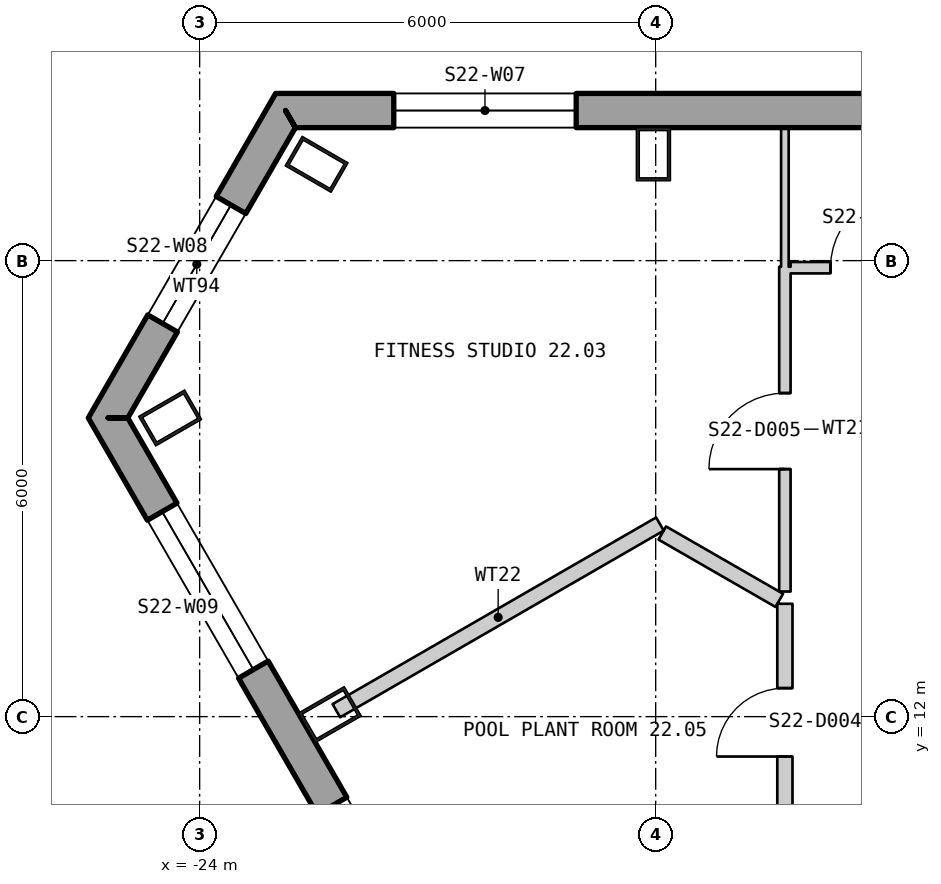
"""IFC4 building model, lengths in metres.
Left out: names, types, materials, properties, quantities, classifications, styles, units other than length and angle.
Written with IfcOpenShell. Run it as: python <this file> out.ifc"""

import sys

from ifc_helpers import new_model, si_unit, direction, frame, frame_2d, origin, origin_2d, place, context, subcontext, project, spatial, polyline, rectangle, hollow_rectangle, outline, extrude, element, fill, save


model = new_model("IFC4")
c1 = context("Model", 3, precision=1e-05, world=origin(), true_north=direction((0.0, 1.0)))
c2 = subcontext(c1, "Body", "Model", "MODEL_VIEW")
j1 = project(units=[si_unit("LENGTHUNIT", "METRE"), si_unit("PLANEANGLEUNIT", "RADIAN")], contexts=[c1])
p1 = place(None, origin())
s1 = spatial("IfcSite", under=j1, at=p1, CompositionType="ELEMENT")
p2 = place(p1, origin())
s2 = spatial("IfcBuilding", under=s1, at=p2, CompositionType="ELEMENT")
p3 = place(p2, frame((0.0, 0.0, 298.2)))
s3 = spatial("IfcBuildingStorey", under=s2, at=p3, CompositionType="ELEMENT", Elevation=298.2)
for number, where, z_axis, x_axis in (
    (1, (-18.03, 19.4, 0.0), (0.0, 0.0, 1.0), (-1.0, 0.0, 0.0)),
    (2, (-22.461, 19.267, 0.0), (0.0, 0.0, 1.0), (-0.5, -0.866, 0.0)),
    (3, (-24.388, 15.93, 0.0), (0.0, 0.0, 1.0), (0.5, -0.866, 0.0)),
    (4, (-22.287, 12.027, 0.0), (0.0, 0.0, 1.0), (0.5, -0.866, 0.0)),
):
    element("IfcColumn", number, at=place(p3, frame(where, z_axis=z_axis, x_axis=x_axis)), inside=s3, PredefinedType="COLUMN", context=c2, shape_type="SweptSolid", body=[
        extrude(hollow_rectangle(XDim=0.45, YDim=0.7, WallThickness=0.04, at=origin_2d()), origin(), (0.0, 0.0, 1.0), 6.0),
    ])
p4 = place(p3, frame((22.87, 19.975, -0.4), z_axis=(0.0, 0.0, 1.0), x_axis=(-1.0, 0.0, 0.0)))
e5 = element("IfcWall", 5, at=p4, inside=s3, PredefinedType="SOLIDWALL", context=c2, shape_type="SweptSolid", body=[
    extrude(outline(polyline([(-0.13, -0.225), (45.87, -0.225), (45.61, 0.225), (0.13, 0.225), (-0.13, -0.225)])), origin(), (0.0, 0.0, 1.0), 6.0),
])
p5 = place(p4, frame((1.424, 0.0, 1.3)))
e6 = element("IfcOpeningElement", 6, at=p5, cuts=e5, PredefinedType="OPENING", context=c2, shape_type="SweptSolid", body=[
    extrude(rectangle(XDim=2.4, YDim=4.1, at=frame_2d((1.2, 2.05))), frame((0.0, 0.235, 0.0), z_axis=(0.0, -1.0, 0.0), x_axis=(1.0, 0.0, 0.0)), (0.0, 0.0, 1.0), 0.47),
])
p6 = place(p4, frame((14.909, 0.0, 1.3)))
e7 = element("IfcOpeningElement", 7, at=p6, cuts=e5, PredefinedType="OPENING", context=c2, shape_type="SweptSolid", body=[
    extrude(rectangle(XDim=2.4, YDim=4.1, at=frame_2d((1.2, 2.05))), frame((0.0, 0.235, 0.0), z_axis=(0.0, -1.0, 0.0), x_axis=(1.0, 0.0, 0.0)), (0.0, 0.0, 1.0), 0.47),
])
p7 = place(p4, frame((19.416, 0.0, 1.3)))
e8 = element("IfcOpeningElement", 8, at=p7, cuts=e5, PredefinedType="OPENING", context=c2, shape_type="SweptSolid", body=[
    extrude(rectangle(XDim=2.4, YDim=4.1, at=frame_2d((1.2, 2.05))), frame((0.0, 0.235, 0.0), z_axis=(0.0, -1.0, 0.0), x_axis=(1.0, 0.0, 0.0)), (0.0, 0.0, 1.0), 0.47),
])
p8 = place(p4, frame((23.924, 0.0, 1.3)))
e9 = element("IfcOpeningElement", 9, at=p8, cuts=e5, PredefinedType="OPENING", context=c2, shape_type="SweptSolid", body=[
    extrude(rectangle(XDim=2.4, YDim=4.1, at=frame_2d((1.2, 2.05))), frame((0.0, 0.235, 0.0), z_axis=(0.0, -1.0, 0.0), x_axis=(1.0, 0.0, 0.0)), (0.0, 0.0, 1.0), 0.47),
])
p9 = place(p4, frame((28.431, 0.0, 1.3)))
e10 = element("IfcOpeningElement", 10, at=p9, cuts=e5, PredefinedType="OPENING", context=c2, shape_type="SweptSolid", body=[
    extrude(rectangle(XDim=2.4, YDim=4.1, at=frame_2d((1.2, 2.05))), frame((0.0, 0.235, 0.0), z_axis=(0.0, -1.0, 0.0), x_axis=(1.0, 0.0, 0.0)), (0.0, 0.0, 1.0), 0.47),
])
p10 = place(p4, frame((32.939, 0.0, 1.3)))
e11 = element("IfcOpeningElement", 11, at=p10, cuts=e5, PredefinedType="OPENING", context=c2, shape_type="SweptSolid", body=[
    extrude(rectangle(XDim=2.4, YDim=4.1, at=frame_2d((1.2, 2.05))), frame((0.0, 0.235, 0.0), z_axis=(0.0, -1.0, 0.0), x_axis=(1.0, 0.0, 0.0)), (0.0, 0.0, 1.0), 0.47),
])
p11 = place(p4, frame((41.916, 0.0, 1.3)))
e12 = element("IfcOpeningElement", 12, at=p11, cuts=e5, PredefinedType="OPENING", context=c2, shape_type="SweptSolid", body=[
    extrude(rectangle(XDim=2.4, YDim=4.1, at=frame_2d((1.2, 2.05))), frame((0.0, 0.235, 0.0), z_axis=(0.0, -1.0, 0.0), x_axis=(1.0, 0.0, 0.0)), (0.0, 0.0, 1.0), 0.47),
])
p12 = place(p3, frame((-22.87, 19.975, -0.4), z_axis=(0.0, 0.0, 1.0), x_axis=(-0.500001097856, -0.866024769936, 0.0)))
e13 = element("IfcWall", 13, at=p12, inside=s3, PredefinedType="SOLIDWALL", context=c2, shape_type="SweptSolid", body=[
    extrude(outline(polyline([(-0.13, -0.225), (4.8, -0.225), (4.54, 0.225), (0.13, 0.225), (-0.13, -0.225)])), origin(), (0.0, 0.0, 1.0), 6.0),
])
p13 = place(p12, frame((1.435, 0.0, 1.3)))
e14 = element("IfcOpeningElement", 14, at=p13, cuts=e13, PredefinedType="OPENING", context=c2, shape_type="SweptSolid", body=[
    extrude(rectangle(XDim=1.8, YDim=4.1, at=frame_2d((0.9, 2.05))), frame((0.0, 0.235, 0.0), z_axis=(0.0, -1.0, 0.0), x_axis=(1.0, 0.0, 0.0)), (0.0, 0.0, 1.0), 0.47),
])
p14 = place(p3, frame((-25.205, 15.931, -0.28), z_axis=(0.0, 0.0, 1.0), x_axis=(0.499999764979, -0.866025539474, 0.0)))
e15 = element("IfcWall", 15, at=p14, inside=s3, PredefinedType="SOLIDWALL", context=c2, shape_type="SweptSolid", body=[
    extrude(outline(polyline([(-0.13, -0.225), (45.87, -0.225), (45.61, 0.225), (0.13, 0.225), (-0.13, -0.225)])), origin(), (0.0, 0.0, 1.0), 6.1),
])
p15 = place(p14, frame((1.424, 0.0, 1.18)))
e16 = element("IfcOpeningElement", 16, at=p15, cuts=e15, PredefinedType="OPENING", context=c2, shape_type="SweptSolid", body=[
    extrude(rectangle(XDim=2.4, YDim=4.1, at=frame_2d((1.2, 2.05))), frame((0.0, 0.235, 0.0), z_axis=(0.0, -1.0, 0.0), x_axis=(1.0, 0.0, 0.0)), (0.0, 0.0, 1.0), 0.47),
])
p16 = place(p14, frame((5.893, 0.0, 1.18)))
e17 = element("IfcOpeningElement", 17, at=p16, cuts=e15, PredefinedType="OPENING", context=c2, shape_type="SweptSolid", body=[
    extrude(rectangle(XDim=2.4, YDim=4.1, at=frame_2d((1.2, 2.05))), frame((0.0, 0.235, 0.0), z_axis=(0.0, -1.0, 0.0), x_axis=(1.0, 0.0, 0.0)), (0.0, 0.0, 1.0), 0.47),
])
p17 = place(p14, frame((10.401, 0.0, 1.18)))
e18 = element("IfcOpeningElement", 18, at=p17, cuts=e15, PredefinedType="OPENING", context=c2, shape_type="SweptSolid", body=[
    extrude(rectangle(XDim=2.4, YDim=4.1, at=frame_2d((1.2, 2.05))), frame((0.0, 0.235, 0.0), z_axis=(0.0, -1.0, 0.0), x_axis=(1.0, 0.0, 0.0)), (0.0, 0.0, 1.0), 0.47),
])
p18 = place(p14, frame((14.909, 0.0, 1.18)))
e19 = element("IfcOpeningElement", 19, at=p18, cuts=e15, PredefinedType="OPENING", context=c2, shape_type="SweptSolid", body=[
    extrude(rectangle(XDim=2.4, YDim=4.1, at=frame_2d((1.2, 2.05))), frame((0.0, 0.235, 0.0), z_axis=(0.0, -1.0, 0.0), x_axis=(1.0, 0.0, 0.0)), (0.0, 0.0, 1.0), 0.47),
])
p19 = place(p14, frame((19.416, 0.0, 1.18)))
e20 = element("IfcOpeningElement", 20, at=p19, cuts=e15, PredefinedType="OPENING", context=c2, shape_type="SweptSolid", body=[
    extrude(rectangle(XDim=2.4, YDim=4.1, at=frame_2d((1.2, 2.05))), frame((0.0, 0.235, 0.0), z_axis=(0.0, -1.0, 0.0), x_axis=(1.0, 0.0, 0.0)), (0.0, 0.0, 1.0), 0.47),
])
p20 = place(p14, frame((23.924, 0.0, 1.18)))
e21 = element("IfcOpeningElement", 21, at=p20, cuts=e15, PredefinedType="OPENING", context=c2, shape_type="SweptSolid", body=[
    extrude(rectangle(XDim=2.4, YDim=4.1, at=frame_2d((1.2, 2.05))), frame((0.0, 0.235, 0.0), z_axis=(0.0, -1.0, 0.0), x_axis=(1.0, 0.0, 0.0)), (0.0, 0.0, 1.0), 0.47),
])
p21 = place(p14, frame((28.431, 0.0, 1.18)))
e22 = element("IfcOpeningElement", 22, at=p21, cuts=e15, PredefinedType="OPENING", context=c2, shape_type="SweptSolid", body=[
    extrude(rectangle(XDim=2.4, YDim=4.1, at=frame_2d((1.2, 2.05))), frame((0.0, 0.235, 0.0), z_axis=(0.0, -1.0, 0.0), x_axis=(1.0, 0.0, 0.0)), (0.0, 0.0, 1.0), 0.47),
])
p22 = place(p14, frame((32.939, 0.0, 1.18)))
e23 = element("IfcOpeningElement", 23, at=p22, cuts=e15, PredefinedType="OPENING", context=c2, shape_type="SweptSolid", body=[
    extrude(rectangle(XDim=2.4, YDim=4.1, at=frame_2d((1.2, 2.05))), frame((0.0, 0.235, 0.0), z_axis=(0.0, -1.0, 0.0), x_axis=(1.0, 0.0, 0.0)), (0.0, 0.0, 1.0), 0.47),
])
p23 = place(p14, frame((37.447, 0.0, 1.18)))
e24 = element("IfcOpeningElement", 24, at=p23, cuts=e15, PredefinedType="OPENING", context=c2, shape_type="SweptSolid", body=[
    extrude(rectangle(XDim=2.4, YDim=4.1, at=frame_2d((1.2, 2.05))), frame((0.0, 0.235, 0.0), z_axis=(0.0, -1.0, 0.0), x_axis=(1.0, 0.0, 0.0)), (0.0, 0.0, 1.0), 0.47),
])
p24 = place(p14, frame((41.916, 0.0, 1.18)))
e25 = element("IfcOpeningElement", 25, at=p24, cuts=e15, PredefinedType="OPENING", context=c2, shape_type="SweptSolid", body=[
    extrude(rectangle(XDim=2.4, YDim=4.1, at=frame_2d((1.2, 2.05))), frame((0.0, 0.235, 0.0), z_axis=(0.0, -1.0, 0.0), x_axis=(1.0, 0.0, 0.0)), (0.0, 0.0, 1.0), 0.47),
])
p25 = place(p3, frame((-22.201, 12.078, 0.0), z_axis=(0.0, 0.0, 1.0), x_axis=(0.866182198585, 0.499728325047, 0.0)))
e26 = element("IfcWall", 26, at=p25, inside=s3, PredefinedType="PARTITIONING", context=c2, shape_type="SweptSolid", body=[
    extrude(rectangle(XDim=4.915, YDim=0.2, at=frame_2d((2.457, 0.0))), origin(), (0.0, 0.0, 1.0), 5.8),
])
p26 = place(p3, frame((-17.913, 14.416, 0.0), z_axis=(0.0, 0.0, 1.0), x_axis=(0.866644592537, -0.498925996743, 0.0)))
e27 = element("IfcWall", 27, at=p26, inside=s3, PredefinedType="PARTITIONING", context=c2, shape_type="SweptSolid", body=[
    extrude(rectangle(XDim=1.776, YDim=0.2, at=frame_2d((0.888, 0.0))), origin(), (0.0, 0.0, 1.0), 5.8),
])
p27 = place(p3, frame((-16.3, 10.416, 0.0), z_axis=(0.0, 0.0, 1.0), x_axis=(0.0, 1.0, 0.0)))
e28 = element("IfcWall", 28, at=p27, inside=s3, PredefinedType="PARTITIONING", context=c2, shape_type="SweptSolid", body=[
    extrude(rectangle(XDim=3.069, YDim=0.2, at=frame_2d((1.534, 0.0))), origin(), (0.0, 0.0, 1.0), 5.8),
])
p28 = place(p27, frame((1.059, 0.0, 0.0)))
e29 = element("IfcOpeningElement", 29, at=p28, cuts=e28, PredefinedType="OPENING", context=c2, shape_type="SweptSolid", body=[
    extrude(rectangle(XDim=0.9, YDim=2.1, at=frame_2d((0.45, 1.05))), frame((0.0, 0.11, 0.0), z_axis=(0.0, -1.0, 0.0), x_axis=(1.0, 0.0, 0.0)), (0.0, 0.0, 1.0), 0.22),
])
p29 = place(p3, frame((-16.3, 13.646, 0.0), z_axis=(0.0, 0.0, 1.0), x_axis=(0.0, 1.0, 0.0)))
e30 = element("IfcWall", 30, at=p29, inside=s3, PredefinedType="PARTITIONING", context=c2, shape_type="SweptSolid", body=[
    extrude(rectangle(XDim=4.273, YDim=0.15, at=frame_2d((2.136, 0.0))), origin(), (0.0, 0.0, 1.0), 5.8),
])
p30 = place(p29, frame((1.611, 0.0, 0.0)))
e31 = element("IfcOpeningElement", 31, at=p30, cuts=e30, PredefinedType="OPENING", context=c2, shape_type="SweptSolid", body=[
    extrude(rectangle(XDim=1.0, YDim=2.1, at=frame_2d((0.5, 1.05))), frame((0.0, 0.085, 0.0), z_axis=(0.0, -1.0, 0.0), x_axis=(1.0, 0.0, 0.0)), (0.0, 0.0, 1.0), 0.17),
])
p31 = place(p3, frame((-16.3, 17.919, 0.0), z_axis=(0.0, 0.0, 1.0), x_axis=(0.0, 1.0, 0.0)))
e32 = element("IfcWall", 32, at=p31, inside=s3, PredefinedType="PARTITIONING", context=c2, shape_type="SweptSolid", body=[
    extrude(rectangle(XDim=1.831, YDim=0.1, at=frame_2d((0.915, 0.0))), origin(), (0.0, 0.0, 1.0), 5.8),
])
p32 = place(p3, frame((-16.225, 17.907, 0.0), z_axis=(0.0, 0.0, 1.0), x_axis=(1.0, 0.0, 0.0)))
e33 = element("IfcWall", 33, at=p32, inside=s3, PredefinedType="PARTITIONING", context=c2, shape_type="SweptSolid", body=[
    extrude(rectangle(XDim=1.725, YDim=0.15, at=frame_2d((0.863, 0.0))), origin(), (0.0, 0.0, 1.0), 5.4),
])
p33 = place(p32, frame((0.525, 0.0, 0.0)))
e34 = element("IfcOpeningElement", 34, at=p33, cuts=e33, PredefinedType="OPENING", context=c2, shape_type="SweptSolid", body=[
    extrude(rectangle(XDim=1.0, YDim=2.1, at=frame_2d((0.5, 1.05))), frame((0.0, 0.085, 0.0), z_axis=(0.0, -1.0, 0.0), x_axis=(1.0, 0.0, 0.0)), (0.0, 0.0, 1.0), 0.17),
])
p34 = place(p11, origin())
e35 = element("IfcWindow", 35, at=p34, inside=s3, PartitioningType="SINGLE_PANEL", PredefinedType="WINDOW", context=c2, shape_type="SweptSolid", body=[
    extrude(rectangle(XDim=2.4, YDim=4.1, at=frame_2d((1.2, 2.05))), frame((0.0, 0.105, 0.0), z_axis=(0.0, -1.0, 0.0), x_axis=(1.0, 0.0, 0.0)), (0.0, 0.0, 1.0), 0.06),
])
fill(e12, e35)
p35 = place(p13, origin())
e36 = element("IfcWindow", 36, at=p35, inside=s3, PartitioningType="SINGLE_PANEL", PredefinedType="WINDOW", context=c2, shape_type="SweptSolid", body=[
    extrude(rectangle(XDim=1.8, YDim=4.1, at=frame_2d((0.9, 2.05))), frame((0.0, 0.105, 0.0), z_axis=(0.0, -1.0, 0.0), x_axis=(1.0, 0.0, 0.0)), (0.0, 0.0, 1.0), 0.06),
])
fill(e14, e36)
p36 = place(p15, origin())
e37 = element("IfcWindow", 37, at=p36, inside=s3, PartitioningType="SINGLE_PANEL", PredefinedType="WINDOW", context=c2, shape_type="SweptSolid", body=[
    extrude(rectangle(XDim=2.4, YDim=4.1, at=frame_2d((1.2, 2.05))), frame((0.0, 0.105, 0.0), z_axis=(0.0, -1.0, 0.0), x_axis=(1.0, 0.0, 0.0)), (0.0, 0.0, 1.0), 0.06),
])
fill(e16, e37)
p37 = place(p16, origin())
e38 = element("IfcWindow", 38, at=p37, inside=s3, PartitioningType="SINGLE_PANEL", PredefinedType="WINDOW", context=c2, shape_type="SweptSolid", body=[
    extrude(rectangle(XDim=2.4, YDim=4.1, at=frame_2d((1.2, 2.05))), frame((0.0, 0.105, 0.0), z_axis=(0.0, -1.0, 0.0), x_axis=(1.0, 0.0, 0.0)), (0.0, 0.0, 1.0), 0.06),
])
fill(e17, e38)
p38 = place(p28, origin())
e39 = element("IfcDoor", 39, at=p38, inside=s3, OperationType="SINGLE_SWING_RIGHT", PredefinedType="DOOR", context=c2, shape_type="SweptSolid", body=[
    extrude(rectangle(XDim=0.9, YDim=2.1, at=frame_2d((0.45, 1.05))), frame((0.0, 0.025, 0.0), z_axis=(0.0, -1.0, 0.0), x_axis=(1.0, 0.0, 0.0)), (0.0, 0.0, 1.0), 0.05),
])
fill(e29, e39)
p39 = place(p30, origin())
e40 = element("IfcDoor", 40, at=p39, inside=s3, OperationType="SINGLE_SWING_RIGHT", PredefinedType="DOOR", context=c2, shape_type="SweptSolid", body=[
    extrude(rectangle(XDim=1.0, YDim=2.1, at=frame_2d((0.5, 1.05))), frame((0.0, 0.025, 0.0), z_axis=(0.0, -1.0, 0.0), x_axis=(1.0, 0.0, 0.0)), (0.0, 0.0, 1.0), 0.05),
])
fill(e31, e40)
p40 = place(p33, origin())
e41 = element("IfcDoor", 41, at=p40, inside=s3, OperationType="SINGLE_SWING_LEFT", PredefinedType="DOOR", context=c2, shape_type="SweptSolid", body=[
    extrude(rectangle(XDim=1.0, YDim=2.1, at=frame_2d((0.5, 1.05))), frame((0.0, 0.025, 0.0), z_axis=(0.0, -1.0, 0.0), x_axis=(1.0, 0.0, 0.0)), (0.0, 0.0, 1.0), 0.05),
])
fill(e34, e41)
save(model, sys.argv[1])
